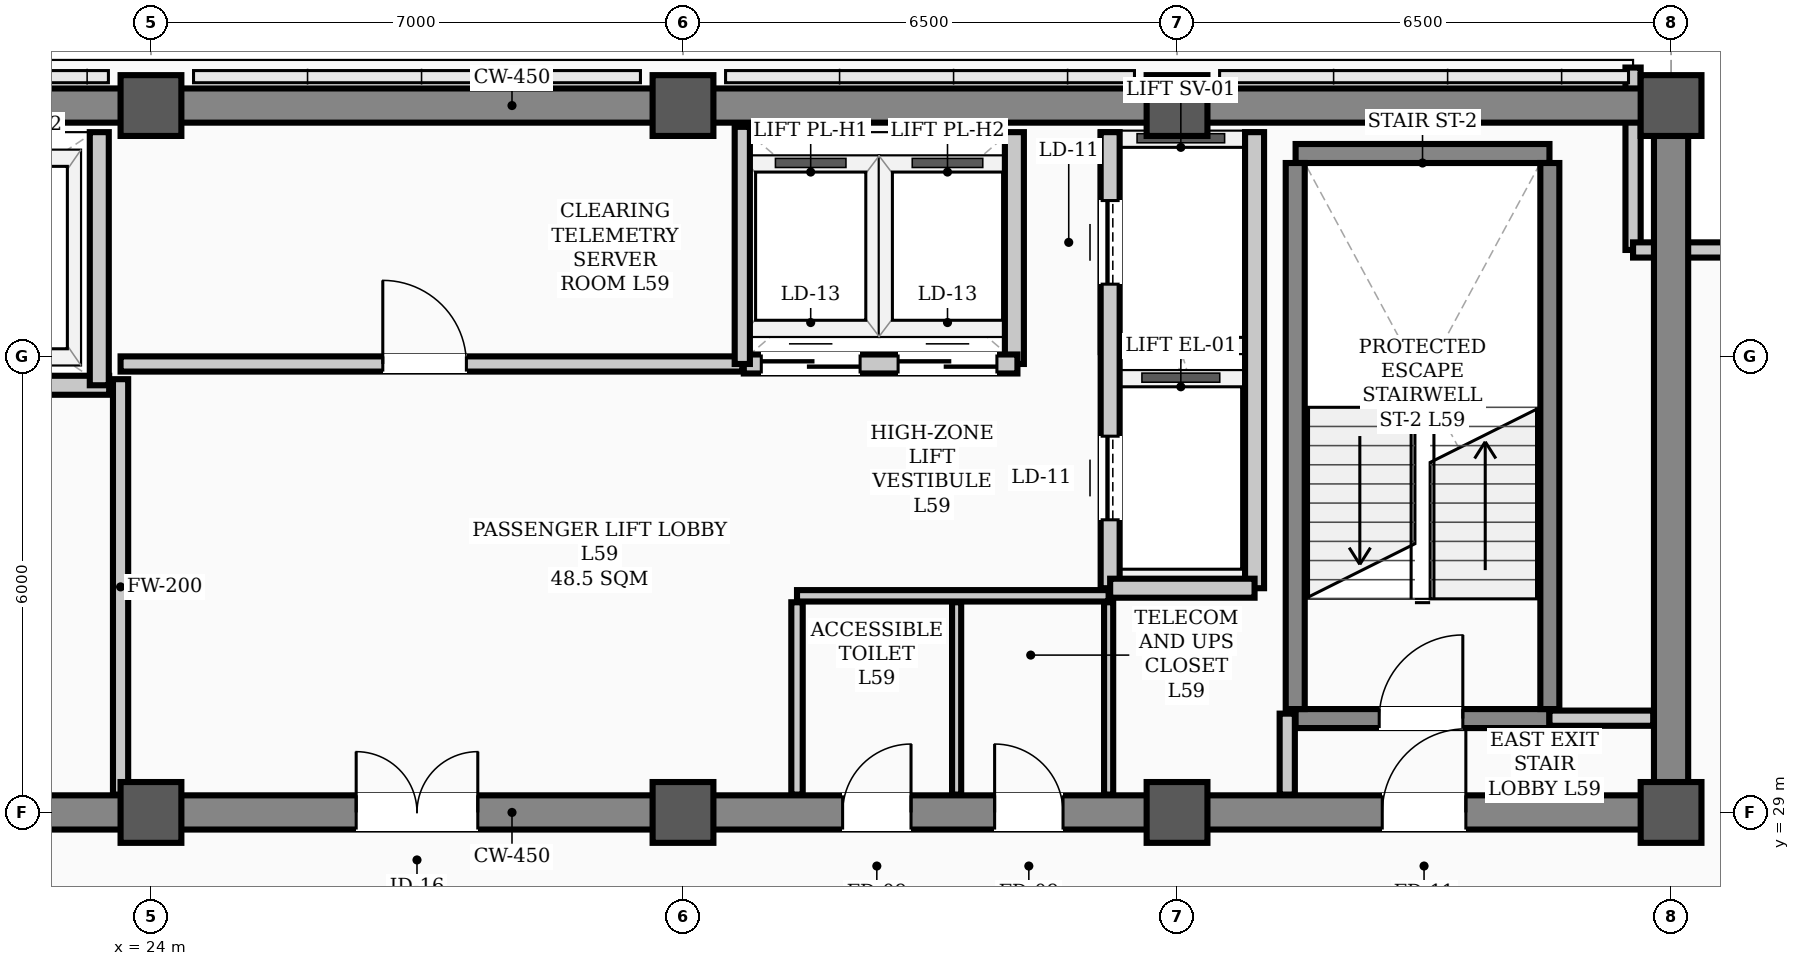
"""IFC4 building model, lengths in metres.
Left out: names, types, materials, properties, quantities, classifications, styles, units other than length and angle.
Written with IfcOpenShell. Run it as: python <this file> out.ifc"""

import sys

from ifc_helpers import new_model, si_unit, direction, frame, frame_2d, origin, origin_2d, place, context, subcontext, project, spatial, rectangle, hollow_rectangle, extrude, element, fill, save


model = new_model("IFC4")
c1 = context("Model", 3, precision=1e-05, world=origin(), true_north=direction((0.0, 1.0)))
c2 = subcontext(c1, "Body", "Model", "MODEL_VIEW")
j1 = project(units=[si_unit("LENGTHUNIT", "METRE"), si_unit("PLANEANGLEUNIT", "RADIAN")], contexts=[c1])
p1 = place(None, origin())
s1 = spatial("IfcSite", under=j1, at=p1, CompositionType="ELEMENT")
p2 = place(p1, origin())
s2 = spatial("IfcBuilding", under=s1, at=p2, CompositionType="ELEMENT")
p3 = place(p2, frame((0.0, 0.0, 238.4)))
s3 = spatial("IfcBuildingStorey", under=s2, at=p3, CompositionType="ELEMENT", Elevation=238.4)
for number, where, z_axis, x_axis in (
    (1, (24.0, 29.0, 0.0), (0.0, 0.0, 1.0), (1.0, 0.0, 0.0)),
    (2, (24.0, 38.3, 0.0), (0.0, 0.0, 1.0), (1.0, 0.0, 0.0)),
    (3, (31.0, 29.0, 0.0), (0.0, 0.0, 1.0), (1.0, 0.0, 0.0)),
    (4, (31.0, 38.3, 0.0), (0.0, 0.0, 1.0), (1.0, 0.0, 0.0)),
    (5, (37.5, 29.0, 0.0), (0.0, 0.0, 1.0), (1.0, 0.0, 0.0)),
    (6, (37.5, 38.3, 0.0), (0.0, 0.0, 1.0), (1.0, 0.0, 0.0)),
    (7, (44.0, 29.0, 0.0), (0.0, 0.0, 1.0), (1.0, 0.0, 0.0)),
    (8, (44.0, 38.3, 0.0), (0.0, 0.0, 1.0), (1.0, 0.0, 0.0)),
):
    element("IfcColumn", number, at=place(p3, frame(where, z_axis=z_axis, x_axis=x_axis)), inside=s3, PredefinedType="COLUMN", context=c2, shape_type="SweptSolid", body=[
        extrude(hollow_rectangle(XDim=0.8, YDim=0.8, WallThickness=0.032, InnerFilletRadius=0.016, OuterFilletRadius=0.048, at=origin_2d()), origin(), (0.0, 0.0, 1.0), 3.9),
    ])
p4 = place(p3, frame((43.5, 38.8, 0.0), z_axis=(0.0, 0.0, 1.0), x_axis=(0.0, -1.0, 0.0)))
e9 = element("IfcWall", 9, at=p4, inside=s3, PredefinedType="PARAPET", context=c2, shape_type="SweptSolid", body=[
    extrude(rectangle(XDim=2.4, YDim=0.2, at=frame_2d((1.2, 0.0))), origin(), (0.0, 0.0, 1.0), 1.2),
])
p5 = place(p3, frame((43.5, 36.4, 0.0), z_axis=(0.0, 0.0, 1.0), x_axis=(1.0, 0.0, 0.0)))
e10 = element("IfcWall", 10, at=p5, inside=s3, PredefinedType="PARAPET", context=c2, shape_type="SweptSolid", body=[
    extrude(rectangle(XDim=2.4, YDim=0.2, at=frame_2d((1.2, 0.0))), origin(), (0.0, 0.0, 1.0), 1.2),
])
p6 = place(p3, frame((13.5, 29.0, 0.0), z_axis=(0.0, 0.0, 1.0), x_axis=(1.0, 0.0, 0.0)))
e11 = element("IfcWall", 11, at=p6, inside=s3, PredefinedType="SHEAR", context=c2, shape_type="SweptSolid", body=[
    extrude(rectangle(XDim=30.5, YDim=0.45, at=frame_2d((15.25, 0.0))), origin(), (0.0, 0.0, 1.0), 3.72),
])
p7 = place(p6, frame((1.75, 0.0, 0.0)))
e12 = element("IfcOpeningElement", 12, at=p7, cuts=e11, PredefinedType="OPENING", context=c2, shape_type="SweptSolid", body=[
    extrude(rectangle(XDim=1.1, YDim=2.08, at=frame_2d((0.55, 1.04))), frame((0.0, 0.235, 0.0), z_axis=(0.0, -1.0, 0.0), x_axis=(1.0, 0.0, 0.0)), (0.0, 0.0, 1.0), 0.47),
])
p8 = place(p6, frame((26.7, 0.0, 0.0)))
e13 = element("IfcOpeningElement", 13, at=p8, cuts=e11, PredefinedType="OPENING", context=c2, shape_type="SweptSolid", body=[
    extrude(rectangle(XDim=1.1, YDim=2.08, at=frame_2d((0.55, 1.04))), frame((0.0, 0.235, 0.0), z_axis=(0.0, -1.0, 0.0), x_axis=(1.0, 0.0, 0.0)), (0.0, 0.0, 1.0), 0.47),
])
p9 = place(p6, frame((6.8, 0.0, 0.0)))
e14 = element("IfcOpeningElement", 14, at=p9, cuts=e11, PredefinedType="OPENING", context=c2, shape_type="SweptSolid", body=[
    extrude(rectangle(XDim=1.1, YDim=2.08, at=frame_2d((0.55, 1.04))), frame((0.0, 0.235, 0.0), z_axis=(0.0, -1.0, 0.0), x_axis=(1.0, 0.0, 0.0)), (0.0, 0.0, 1.0), 0.47),
])
p10 = place(p6, frame((13.2, 0.0, 0.0)))
e15 = element("IfcOpeningElement", 15, at=p10, cuts=e11, PredefinedType="OPENING", context=c2, shape_type="SweptSolid", body=[
    extrude(rectangle(XDim=1.6, YDim=2.08, at=frame_2d((0.8, 1.04))), frame((0.0, 0.235, 0.0), z_axis=(0.0, -1.0, 0.0), x_axis=(1.0, 0.0, 0.0)), (0.0, 0.0, 1.0), 0.47),
])
p11 = place(p6, frame((19.6, 0.0, 0.0)))
e16 = element("IfcOpeningElement", 16, at=p11, cuts=e11, PredefinedType="OPENING", context=c2, shape_type="SweptSolid", body=[
    extrude(rectangle(XDim=0.9, YDim=2.08, at=frame_2d((0.45, 1.04))), frame((0.0, 0.235, 0.0), z_axis=(0.0, -1.0, 0.0), x_axis=(1.0, 0.0, 0.0)), (0.0, 0.0, 1.0), 0.47),
])
p12 = place(p6, frame((21.6, 0.0, 0.0)))
e17 = element("IfcOpeningElement", 17, at=p12, cuts=e11, PredefinedType="OPENING", context=c2, shape_type="SweptSolid", body=[
    extrude(rectangle(XDim=0.9, YDim=2.08, at=frame_2d((0.45, 1.04))), frame((0.0, 0.235, 0.0), z_axis=(0.0, -1.0, 0.0), x_axis=(1.0, 0.0, 0.0)), (0.0, 0.0, 1.0), 0.47),
])
p13 = place(p3, frame((13.5, 38.3, 0.0), z_axis=(0.0, 0.0, 1.0), x_axis=(1.0, 0.0, 0.0)))
e18 = element("IfcWall", 18, at=p13, inside=s3, PredefinedType="SHEAR", context=c2, shape_type="SweptSolid", body=[
    extrude(rectangle(XDim=30.5, YDim=0.45, at=frame_2d((15.25, 0.0))), origin(), (0.0, 0.0, 1.0), 3.72),
])
p14 = place(p3, frame((44.0, 29.35, 0.0), z_axis=(0.0, 0.0, 1.0), x_axis=(0.0, 1.0, 0.0)))
e19 = element("IfcWall", 19, at=p14, inside=s3, PredefinedType="SHEAR", context=c2, shape_type="SweptSolid", body=[
    extrude(rectangle(XDim=8.6, YDim=0.45, at=frame_2d((4.3, 0.0))), origin(), (0.0, 0.0, 1.0), 3.72),
])
p15 = place(p3, frame((39.06, 30.235, 0.0), z_axis=(0.0, 0.0, 1.0), x_axis=(1.0, 0.0, 0.0)))
e20 = element("IfcWall", 20, at=p15, inside=s3, PredefinedType="STANDARD", context=c2, shape_type="SweptSolid", body=[
    extrude(rectangle(XDim=3.34, YDim=0.25, at=frame_2d((1.67, 0.0))), origin(), (0.0, 0.0, 1.0), 3.72),
])
p16 = place(p15, frame((1.1, 0.0, 0.0)))
e21 = element("IfcOpeningElement", 21, at=p16, cuts=e20, PredefinedType="OPENING", context=c2, shape_type="SweptSolid", body=[
    extrude(rectangle(XDim=1.1, YDim=2.08, at=frame_2d((0.55, 1.04))), frame((0.0, 0.135, 0.0), z_axis=(0.0, -1.0, 0.0), x_axis=(1.0, 0.0, 0.0)), (0.0, 0.0, 1.0), 0.27),
])
p17 = place(p3, frame((39.06, 37.669, 0.0), z_axis=(0.0, 0.0, 1.0), x_axis=(1.0, 0.0, 0.0)))
e22 = element("IfcWall", 22, at=p17, inside=s3, PredefinedType="STANDARD", context=c2, shape_type="SweptSolid", body=[
    extrude(rectangle(XDim=3.34, YDim=0.25, at=frame_2d((1.67, 0.0))), origin(), (0.0, 0.0, 1.0), 3.72),
])
for number, where, z_axis, x_axis in (
    (23, (39.055, 30.36, 0.0), (0.0, 0.0, 1.0), (0.0, 1.0, 0.0)),
    (24, (42.405, 30.36, 0.0), (0.0, 0.0, 1.0), (0.0, 1.0, 0.0)),
):
    element("IfcWall", number, at=place(p3, frame(where, z_axis=z_axis, x_axis=x_axis)), inside=s3, PredefinedType="STANDARD", context=c2, shape_type="SweptSolid", body=[
        extrude(rectangle(XDim=7.184, YDim=0.25, at=frame_2d((3.592, 0.0))), origin(), (0.0, 0.0, 1.0), 3.72),
    ])
p18 = place(p3, frame((18.1, 34.62, 0.0), z_axis=(0.0, 0.0, 1.0), x_axis=(1.0, 0.0, 0.0)))
e25 = element("IfcWall", 25, at=p18, inside=s3, PredefinedType="STANDARD", context=c2, shape_type="SweptSolid", body=[
    extrude(rectangle(XDim=5.35, YDim=0.25, at=frame_2d((2.675, 0.0))), origin(), (0.0, 0.0, 1.0), 3.72),
])
p19 = place(p18, frame((0.85, 0.0, 0.0)))
e26 = element("IfcOpeningElement", 26, at=p19, cuts=e25, PredefinedType="OPENING", context=c2, shape_type="SweptSolid", body=[
    extrude(rectangle(XDim=1.1, YDim=2.08, at=frame_2d((0.55, 1.04))), frame((0.0, 0.135, 0.0), z_axis=(0.0, -1.0, 0.0), x_axis=(1.0, 0.0, 0.0)), (0.0, 0.0, 1.0), 0.27),
])
p20 = place(p18, frame((3.45, 0.0, 0.0)))
e27 = element("IfcOpeningElement", 27, at=p20, cuts=e25, PredefinedType="OPENING", context=c2, shape_type="SweptSolid", body=[
    extrude(rectangle(XDim=1.1, YDim=2.08, at=frame_2d((0.55, 1.04))), frame((0.0, 0.135, 0.0), z_axis=(0.0, -1.0, 0.0), x_axis=(1.0, 0.0, 0.0)), (0.0, 0.0, 1.0), 0.27),
])
p21 = place(p3, frame((36.62, 31.95, 0.0), z_axis=(0.0, 0.0, 1.0), x_axis=(0.0, 1.0, 0.0)))
e28 = element("IfcWall", 28, at=p21, inside=s3, PredefinedType="STANDARD", context=c2, shape_type="SweptSolid", body=[
    extrude(rectangle(XDim=6.0, YDim=0.25, at=frame_2d((3.0, 0.0))), origin(), (0.0, 0.0, 1.0), 3.72),
])
p22 = place(p21, frame((0.9, 0.0, 0.0)))
e29 = element("IfcOpeningElement", 29, at=p22, cuts=e28, PredefinedType="OPENING", context=c2, shape_type="SweptSolid", body=[
    extrude(rectangle(XDim=1.1, YDim=2.08, at=frame_2d((0.55, 1.04))), frame((0.0, 0.135, 0.0), z_axis=(0.0, -1.0, 0.0), x_axis=(1.0, 0.0, 0.0)), (0.0, 0.0, 1.0), 0.27),
])
p23 = place(p21, frame((4.0, 0.0, 0.0)))
e30 = element("IfcOpeningElement", 30, at=p23, cuts=e28, PredefinedType="OPENING", context=c2, shape_type="SweptSolid", body=[
    extrude(rectangle(XDim=1.1, YDim=2.08, at=frame_2d((0.55, 1.04))), frame((0.0, 0.135, 0.0), z_axis=(0.0, -1.0, 0.0), x_axis=(1.0, 0.0, 0.0)), (0.0, 0.0, 1.0), 0.27),
])
p24 = place(p3, frame((38.52, 31.95, 0.0), z_axis=(0.0, 0.0, 1.0), x_axis=(0.0, 1.0, 0.0)))
e31 = element("IfcWall", 31, at=p24, inside=s3, PredefinedType="STANDARD", context=c2, shape_type="SweptSolid", body=[
    extrude(rectangle(XDim=6.0, YDim=0.25, at=frame_2d((3.0, 0.0))), origin(), (0.0, 0.0, 1.0), 3.48),
])
p25 = place(p3, frame((36.62, 31.95, 0.0), z_axis=(0.0, 0.0, 1.0), x_axis=(1.0, 0.0, 0.0)))
e32 = element("IfcWall", 32, at=p25, inside=s3, PredefinedType="STANDARD", context=c2, shape_type="SweptSolid", body=[
    extrude(rectangle(XDim=1.9, YDim=0.25, at=frame_2d((0.95, 0.0))), origin(), (0.0, 0.0, 1.0), 3.48),
])
p26 = place(p3, frame((23.32, 34.62, 0.0), z_axis=(0.0, 0.0, 1.0), x_axis=(0.0, 1.0, 0.0)))
e33 = element("IfcWall", 33, at=p26, inside=s3, PredefinedType="STANDARD", context=c2, shape_type="SweptSolid", body=[
    extrude(rectangle(XDim=3.33, YDim=0.25, at=frame_2d((1.665, 0.0))), origin(), (0.0, 0.0, 1.0), 3.72),
])
p27 = place(p3, frame((35.36, 34.9, 0.0), z_axis=(0.0, 0.0, 1.0), x_axis=(0.0, 1.0, 0.0)))
e34 = element("IfcWall", 34, at=p27, inside=s3, PredefinedType="STANDARD", context=c2, shape_type="SweptSolid", body=[
    extrude(rectangle(XDim=3.05, YDim=0.25, at=frame_2d((1.525, 0.0))), origin(), (0.0, 0.0, 1.0), 3.72),
])
p28 = place(p3, frame((31.8, 34.9, 0.0), z_axis=(0.0, 0.0, 1.0), x_axis=(1.0, 0.0, 0.0)))
e35 = element("IfcWall", 35, at=p28, inside=s3, PredefinedType="STANDARD", context=c2, shape_type="SweptSolid", body=[
    extrude(rectangle(XDim=3.6, YDim=0.25, at=frame_2d((1.8, 0.0))), origin(), (0.0, 0.0, 1.0), 3.72),
])
p29 = place(p28, frame((0.23, 0.0, 0.0)))
e36 = element("IfcOpeningElement", 36, at=p29, cuts=e35, PredefinedType="OPENING", context=c2, shape_type="SweptSolid", body=[
    extrude(rectangle(XDim=1.3, YDim=2.08, at=frame_2d((0.65, 1.04))), frame((0.0, 0.135, 0.0), z_axis=(0.0, -1.0, 0.0), x_axis=(1.0, 0.0, 0.0)), (0.0, 0.0, 1.0), 0.27),
])
p30 = place(p28, frame((2.03, 0.0, 0.0)))
e37 = element("IfcOpeningElement", 37, at=p30, cuts=e35, PredefinedType="OPENING", context=c2, shape_type="SweptSolid", body=[
    extrude(rectangle(XDim=1.3, YDim=2.08, at=frame_2d((0.65, 1.04))), frame((0.0, 0.135, 0.0), z_axis=(0.0, -1.0, 0.0), x_axis=(1.0, 0.0, 0.0)), (0.0, 0.0, 1.0), 0.27),
])
p31 = place(p3, frame((42.4, 30.24, 0.0), z_axis=(0.0, 0.0, 1.0), x_axis=(1.0, 0.0, 0.0)))
e38 = element("IfcWall", 38, at=p31, inside=s3, PredefinedType="STANDARD", context=c2, shape_type="SweptSolid", body=[
    extrude(rectangle(XDim=1.365, YDim=0.2, at=frame_2d((0.683, 0.0))), origin(), (0.0, 0.0, 1.0), 3.72),
])
p32 = place(p3, frame((23.6, 34.9, 0.0), z_axis=(0.0, 0.0, 1.0), x_axis=(1.0, 0.0, 0.0)))
e39 = element("IfcWall", 39, at=p32, inside=s3, PredefinedType="STANDARD", context=c2, shape_type="SweptSolid", body=[
    extrude(rectangle(XDim=8.18, YDim=0.2, at=frame_2d((4.09, 0.0))), origin(), (0.0, 0.0, 1.0), 3.72),
])
p33 = place(p32, frame((3.45, 0.0, 0.0)))
e40 = element("IfcOpeningElement", 40, at=p33, cuts=e39, PredefinedType="OPENING", context=c2, shape_type="SweptSolid", body=[
    extrude(rectangle(XDim=1.1, YDim=2.08, at=frame_2d((0.55, 1.04))), frame((0.0, 0.11, 0.0), z_axis=(0.0, -1.0, 0.0), x_axis=(1.0, 0.0, 0.0)), (0.0, 0.0, 1.0), 0.22),
])
p34 = place(p3, frame((32.5, 31.85, 0.0), z_axis=(0.0, 0.0, 1.0), x_axis=(1.0, 0.0, 0.0)))
e41 = element("IfcWall", 41, at=p34, inside=s3, PredefinedType="PARTITIONING", context=c2, shape_type="SweptSolid", body=[
    extrude(rectangle(XDim=4.1, YDim=0.15, at=frame_2d((2.05, 0.0))), origin(), (0.0, 0.0, 1.0), 3.72),
])
p35 = place(p3, frame((38.95, 29.235, 0.0), z_axis=(0.0, 0.0, 1.0), x_axis=(0.0, 1.0, 0.0)))
e42 = element("IfcWall", 42, at=p35, inside=s3, PredefinedType="STANDARD", context=c2, shape_type="SweptSolid", body=[
    extrude(rectangle(XDim=1.065, YDim=0.2, at=frame_2d((0.532, 0.0))), origin(), (0.0, 0.0, 1.0), 3.72),
])
p36 = place(p3, frame((23.6, 29.235, 0.0), z_axis=(0.0, 0.0, 1.0), x_axis=(0.0, 1.0, 0.0)))
e43 = element("IfcWall", 43, at=p36, inside=s3, PredefinedType="STANDARD", context=c2, shape_type="SweptSolid", body=[
    extrude(rectangle(XDim=5.465, YDim=0.2, at=frame_2d((2.732, 0.0))), origin(), (0.0, 0.0, 1.0), 3.2),
])
p37 = place(p3, frame((32.5, 29.235, 0.0), z_axis=(0.0, 0.0, 1.0), x_axis=(0.0, 1.0, 0.0)))
e44 = element("IfcWall", 44, at=p37, inside=s3, PredefinedType="PARTITIONING", context=c2, shape_type="SweptSolid", body=[
    extrude(rectangle(XDim=2.53, YDim=0.15, at=frame_2d((1.265, 0.0))), origin(), (0.0, 0.0, 1.0), 3.35),
])
for number, where, z_axis, x_axis in (
    (45, (36.6, 29.235, 0.0), (0.0, 0.0, 1.0), (0.0, 1.0, 0.0)),
    (46, (34.6, 29.235, 0.0), (0.0, 0.0, 1.0), (0.0, 1.0, 0.0)),
):
    element("IfcWall", number, at=place(p3, frame(where, z_axis=z_axis, x_axis=x_axis)), inside=s3, PredefinedType="PARTITIONING", context=c2, shape_type="SweptSolid", body=[
        extrude(rectangle(XDim=2.53, YDim=0.12, at=frame_2d((1.265, 0.0))), origin(), (0.0, 0.0, 1.0), 3.35),
    ])
p38 = place(p3, frame((31.78, 34.9, 0.0), z_axis=(0.0, 0.0, 1.0), x_axis=(0.0, 1.0, 0.0)))
e47 = element("IfcWall", 47, at=p38, inside=s3, PredefinedType="STANDARD", context=c2, shape_type="SweptSolid", body=[
    extrude(rectangle(XDim=3.12, YDim=0.2, at=frame_2d((1.56, 0.0))), origin(), (0.0, 0.0, 1.0), 3.72),
])
p39 = place(p16, origin())
e48 = element("IfcDoor", 48, at=p39, inside=s3, OperationType="SINGLE_SWING_RIGHT", PredefinedType="DOOR", context=c2, shape_type="SweptSolid", body=[
    extrude(rectangle(XDim=1.1, YDim=2.08, at=frame_2d((0.55, 1.04))), frame((0.0, 0.025, 0.0), z_axis=(0.0, -1.0, 0.0), x_axis=(1.0, 0.0, 0.0)), (0.0, 0.0, 1.0), 0.05),
])
fill(e21, e48)
p40 = place(p8, origin())
e49 = element("IfcDoor", 49, at=p40, inside=s3, OperationType="SINGLE_SWING_RIGHT", PredefinedType="DOOR", context=c2, shape_type="SweptSolid", body=[
    extrude(rectangle(XDim=1.1, YDim=2.08, at=frame_2d((0.55, 1.04))), frame((0.0, 0.025, 0.0), z_axis=(0.0, -1.0, 0.0), x_axis=(1.0, 0.0, 0.0)), (0.0, 0.0, 1.0), 0.05),
])
fill(e13, e49)
p41 = place(p10, origin())
e50 = element("IfcDoor", 50, at=p41, inside=s3, OperationType="DOUBLE_DOOR_SINGLE_SWING", PredefinedType="DOOR", context=c2, shape_type="SweptSolid", body=[
    extrude(rectangle(XDim=1.6, YDim=2.08, at=frame_2d((0.8, 1.04))), frame((0.0, 0.025, 0.0), z_axis=(0.0, -1.0, 0.0), x_axis=(1.0, 0.0, 0.0)), (0.0, 0.0, 1.0), 0.05),
])
fill(e15, e50)
p42 = place(p33, origin())
e51 = element("IfcDoor", 51, at=p42, inside=s3, OperationType="SINGLE_SWING_LEFT", PredefinedType="DOOR", context=c2, shape_type="SweptSolid", body=[
    extrude(rectangle(XDim=1.1, YDim=2.08, at=frame_2d((0.55, 1.04))), frame((0.0, 0.025, 0.0), z_axis=(0.0, -1.0, 0.0), x_axis=(1.0, 0.0, 0.0)), (0.0, 0.0, 1.0), 0.05),
])
fill(e40, e51)
p43 = place(p11, origin())
e52 = element("IfcDoor", 52, at=p43, inside=s3, OperationType="SINGLE_SWING_RIGHT", PredefinedType="DOOR", context=c2, shape_type="SweptSolid", body=[
    extrude(rectangle(XDim=0.9, YDim=2.08, at=frame_2d((0.45, 1.04))), frame((0.0, 0.025, 0.0), z_axis=(0.0, -1.0, 0.0), x_axis=(1.0, 0.0, 0.0)), (0.0, 0.0, 1.0), 0.05),
])
fill(e16, e52)
p44 = place(p12, origin())
e53 = element("IfcDoor", 53, at=p44, inside=s3, OperationType="SINGLE_SWING_LEFT", PredefinedType="DOOR", context=c2, shape_type="SweptSolid", body=[
    extrude(rectangle(XDim=0.9, YDim=2.08, at=frame_2d((0.45, 1.04))), frame((0.0, 0.025, 0.0), z_axis=(0.0, -1.0, 0.0), x_axis=(1.0, 0.0, 0.0)), (0.0, 0.0, 1.0), 0.05),
])
fill(e17, e53)
p45 = place(p22, origin())
e54 = element("IfcDoor", 54, at=p45, inside=s3, OperationType="SLIDING_TO_LEFT", PredefinedType="DOOR", context=c2, shape_type="SweptSolid", body=[
    extrude(rectangle(XDim=1.1, YDim=2.08, at=frame_2d((0.55, 1.04))), frame((0.0, 0.025, 0.0), z_axis=(0.0, -1.0, 0.0), x_axis=(1.0, 0.0, 0.0)), (0.0, 0.0, 1.0), 0.05),
])
fill(e29, e54)
p46 = place(p23, origin())
e55 = element("IfcDoor", 55, at=p46, inside=s3, OperationType="SLIDING_TO_LEFT", PredefinedType="DOOR", context=c2, shape_type="SweptSolid", body=[
    extrude(rectangle(XDim=1.1, YDim=2.08, at=frame_2d((0.55, 1.04))), frame((0.0, 0.025, 0.0), z_axis=(0.0, -1.0, 0.0), x_axis=(1.0, 0.0, 0.0)), (0.0, 0.0, 1.0), 0.05),
])
fill(e30, e55)
p47 = place(p29, origin())
e56 = element("IfcDoor", 56, at=p47, inside=s3, OperationType="DOUBLE_DOOR_SLIDING", PredefinedType="DOOR", context=c2, shape_type="SweptSolid", body=[
    extrude(rectangle(XDim=1.3, YDim=2.08, at=frame_2d((0.65, 1.04))), frame((0.0, 0.025, 0.0), z_axis=(0.0, -1.0, 0.0), x_axis=(1.0, 0.0, 0.0)), (0.0, 0.0, 1.0), 0.05),
])
fill(e36, e56)
p48 = place(p30, origin())
e57 = element("IfcDoor", 57, at=p48, inside=s3, OperationType="DOUBLE_DOOR_SLIDING", PredefinedType="DOOR", context=c2, shape_type="SweptSolid", body=[
    extrude(rectangle(XDim=1.3, YDim=2.08, at=frame_2d((0.65, 1.04))), frame((0.0, 0.025, 0.0), z_axis=(0.0, -1.0, 0.0), x_axis=(1.0, 0.0, 0.0)), (0.0, 0.0, 1.0), 0.05),
])
fill(e37, e57)
save(model, sys.argv[1])
